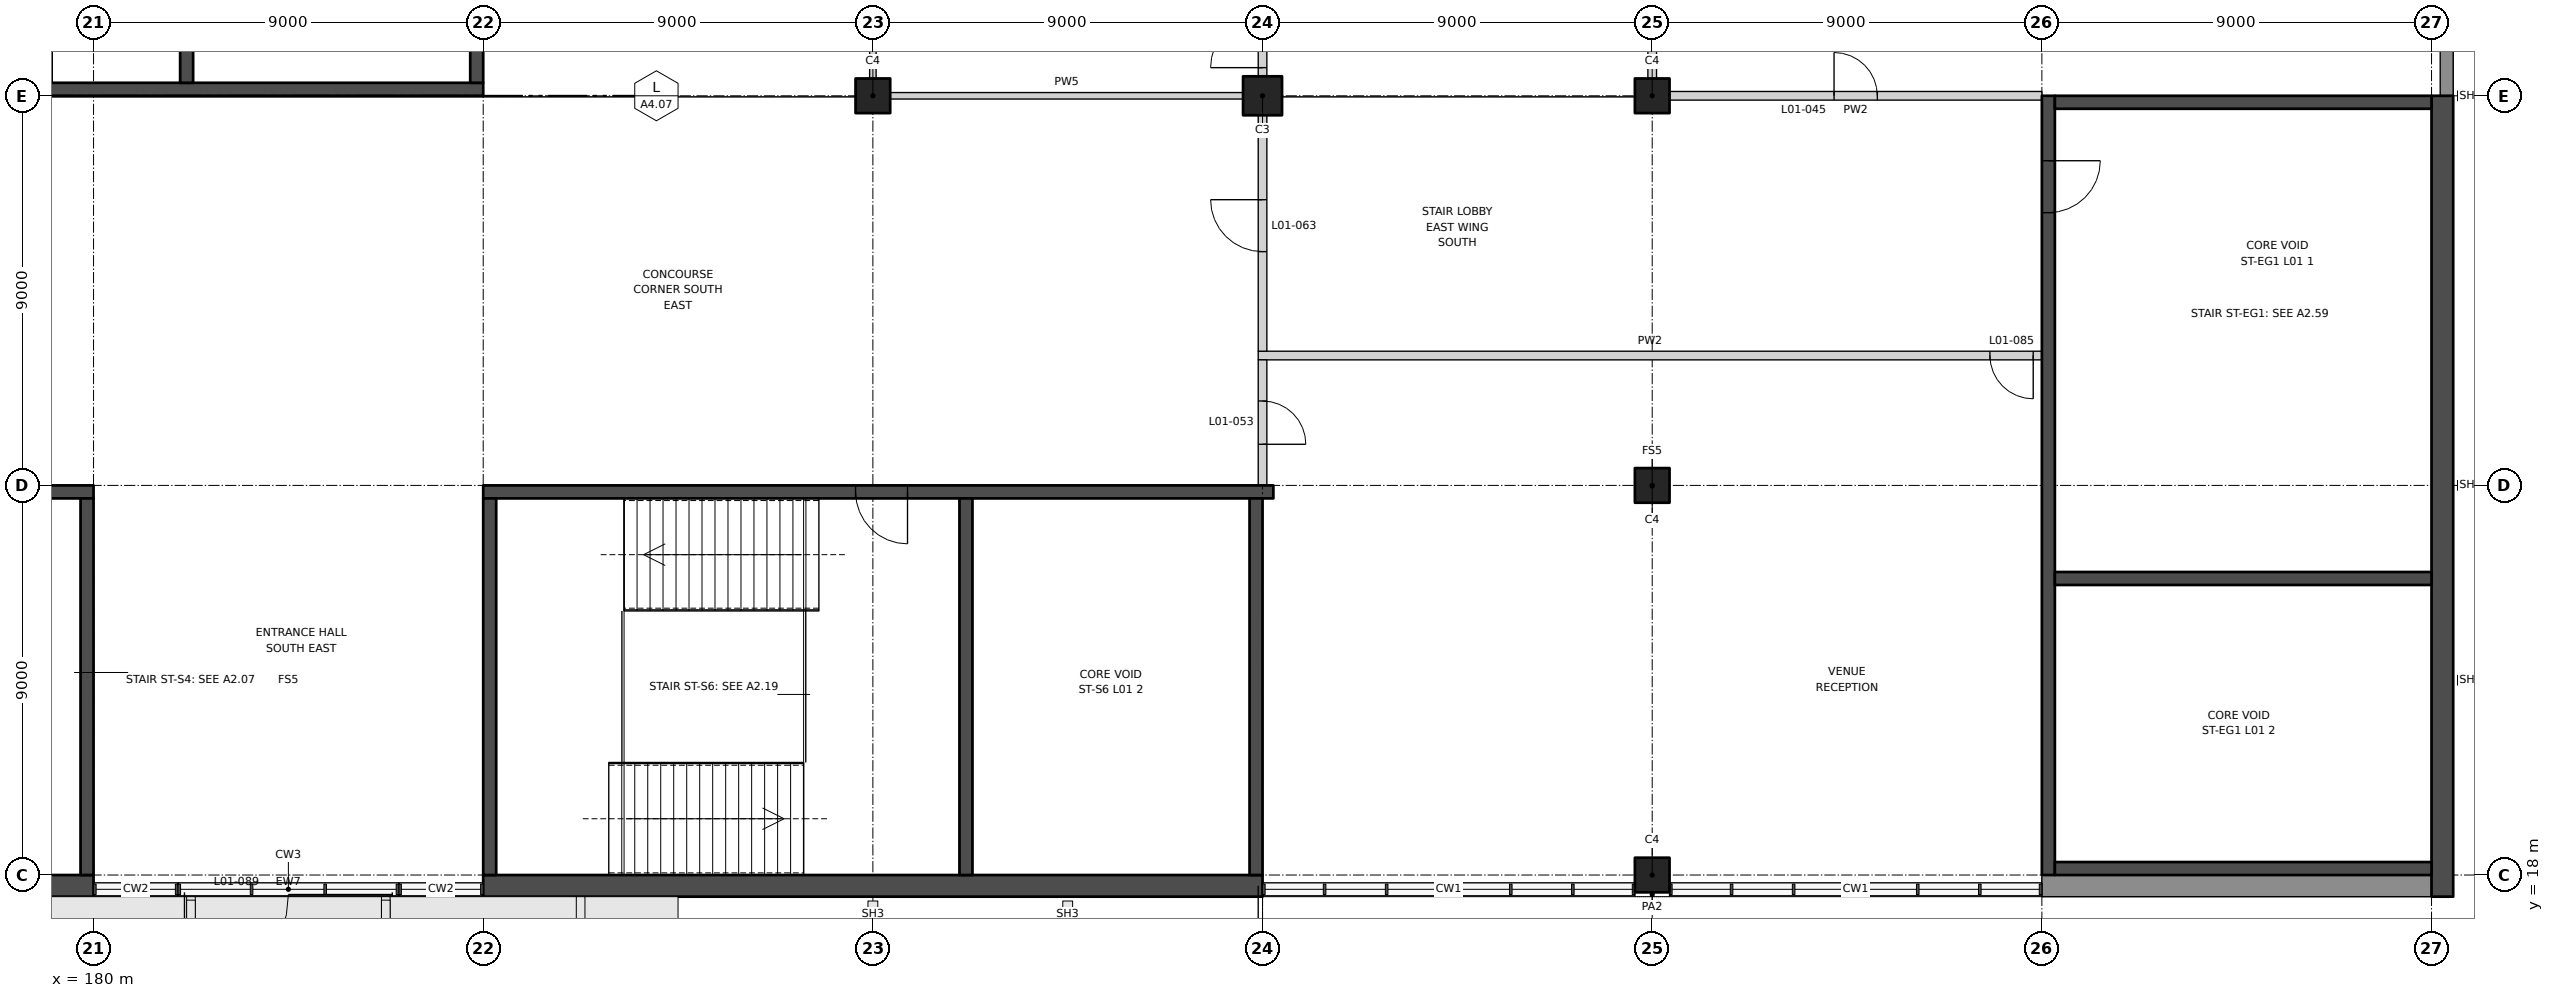
"""IFC4 building model, lengths in metres.
Left out: names, types, materials, properties, quantities, classifications, styles, units other than length and angle.
Written with IfcOpenShell. Run it as: python <this file> out.ifc"""

import sys

from ifc_helpers import new_model, si_unit, direction, frame, frame_2d, origin, origin_2d, place, context, subcontext, project, spatial, rectangle, extrude, element, fill, save


model = new_model("IFC4")
c1 = context("Model", 3, precision=1e-05, world=origin(), true_north=direction((0.0, 1.0)))
c2 = subcontext(c1, "Body", "Model", "MODEL_VIEW")
j1 = project(units=[si_unit("LENGTHUNIT", "METRE"), si_unit("PLANEANGLEUNIT", "RADIAN")], contexts=[c1])
p1 = place(None, origin())
s1 = spatial("IfcSite", under=j1, at=p1, CompositionType="ELEMENT")
p2 = place(p1, origin())
s2 = spatial("IfcBuilding", under=s1, at=p2, CompositionType="ELEMENT")
p3 = place(p2, frame((0.0, 0.0, 7.0)))
s3 = spatial("IfcBuildingStorey", under=s2, at=p3, CompositionType="ELEMENT", Elevation=7.0)
p4 = place(p3, frame((207.0, 36.0, 0.0), z_axis=(0.0, 0.0, 1.0), x_axis=(1.0, 0.0, 0.0)))
e1 = element("IfcColumn", 1, at=p4, inside=s3, PredefinedType="COLUMN", context=c2, shape_type="SweptSolid", body=[
    extrude(rectangle(XDim=0.9, YDim=0.9, at=origin_2d()), origin(), (0.0, 0.0, 1.0), 4.5),
])
for number, where, z_axis, x_axis in (
    (2, (198.0, 36.0, 0.0), (0.0, 0.0, 1.0), (1.0, 0.0, 0.0)),
    (3, (216.0, 18.0, 0.0), (0.0, 0.0, 1.0), (1.0, 0.0, 0.0)),
    (4, (216.0, 27.0, 0.0), (0.0, 0.0, 1.0), (1.0, 0.0, 0.0)),
    (5, (216.0, 36.0, 0.0), (0.0, 0.0, 1.0), (1.0, 0.0, 0.0)),
):
    element("IfcColumn", number, at=place(p3, frame(where, z_axis=z_axis, x_axis=x_axis)), inside=s3, PredefinedType="COLUMN", context=c2, shape_type="SweptSolid", body=[
        extrude(rectangle(XDim=0.8, YDim=0.8, at=origin_2d()), origin(), (0.0, 0.0, 1.0), 4.5),
    ])
p5 = place(p3, frame((206.9, 30.0, 0.0), z_axis=(0.0, 0.0, 1.0), x_axis=(1.0, 0.0, 0.0)))
e6 = element("IfcWall", 6, at=p5, inside=s3, PredefinedType="PARTITIONING", context=c2, shape_type="SweptSolid", body=[
    extrude(rectangle(XDim=18.1, YDim=0.2, at=frame_2d((9.05, 0.0))), origin(), (0.0, 0.0, 1.0), 4.5),
])
p6 = place(p5, frame((16.9, 0.0, 0.0)))
e7 = element("IfcOpeningElement", 7, at=p6, cuts=e6, PredefinedType="OPENING", context=c2, shape_type="SweptSolid", body=[
    extrude(rectangle(XDim=1.0, YDim=2.1, at=frame_2d((0.5, 1.05))), frame((0.0, 0.11, 0.0), z_axis=(0.0, -1.0, 0.0), x_axis=(1.0, 0.0, 0.0)), (0.0, 0.0, 1.0), 0.22),
])
p7 = place(p3, frame((198.4, 36.0, 0.0), z_axis=(0.0, 0.0, 1.0), x_axis=(1.0, 0.0, 0.0)))
e8 = element("IfcWall", 8, at=p7, inside=s3, PredefinedType="PARTITIONING", context=c2, shape_type="SweptSolid", body=[
    extrude(rectangle(XDim=8.15, YDim=0.15, at=frame_2d((4.075, 0.0))), origin(), (0.0, 0.0, 1.0), 3.25),
])
p8 = place(p3, frame((216.4, 36.0, 0.0), z_axis=(0.0, 0.0, 1.0), x_axis=(1.0, 0.0, 0.0)))
e9 = element("IfcWall", 9, at=p8, inside=s3, PredefinedType="PARTITIONING", context=c2, shape_type="SweptSolid", body=[
    extrude(rectangle(XDim=8.6, YDim=0.2, at=frame_2d((4.3, 0.0))), origin(), (0.0, 0.0, 1.0), 3.25),
])
p9 = place(p8, frame((3.8, 0.0, 0.0)))
e10 = element("IfcOpeningElement", 10, at=p9, cuts=e9, PredefinedType="OPENING", context=c2, shape_type="SweptSolid", body=[
    extrude(rectangle(XDim=1.0, YDim=2.1, at=frame_2d((0.5, 1.05))), frame((0.0, 0.11, 0.0), z_axis=(0.0, -1.0, 0.0), x_axis=(1.0, 0.0, 0.0)), (0.0, 0.0, 1.0), 0.22),
])
p10 = place(p3, frame((198.0, 36.4, 0.0), z_axis=(0.0, 0.0, 1.0), x_axis=(0.0, 1.0, 0.0)))
e11 = element("IfcWall", 11, at=p10, inside=s3, PredefinedType="PARTITIONING", context=c2, shape_type="SweptSolid", body=[
    extrude(rectangle(XDim=8.2, YDim=0.15, at=frame_2d((4.1, 0.0))), origin(), (0.0, 0.0, 1.0), 3.25),
])
p11 = place(p10, frame((2.6, 0.0, 0.0)))
e12 = element("IfcOpeningElement", 12, at=p11, cuts=e11, PredefinedType="OPENING", context=c2, shape_type="SweptSolid", body=[
    extrude(rectangle(XDim=3.0, YDim=2.4, at=frame_2d((1.5, 1.2))), frame((0.0, 0.085, 0.0), z_axis=(0.0, -1.0, 0.0), x_axis=(1.0, 0.0, 0.0)), (0.0, 0.0, 1.0), 0.17),
])
p12 = place(p3, frame((207.0, 27.0, 0.0), z_axis=(0.0, 0.0, 1.0), x_axis=(0.0, 1.0, 0.0)))
e13 = element("IfcWall", 13, at=p12, inside=s3, PredefinedType="PARTITIONING", context=c2, shape_type="SweptSolid", body=[
    extrude(rectangle(XDim=2.9, YDim=0.2, at=frame_2d((1.45, 0.0))), origin(), (0.0, 0.0, 1.0), 3.25),
])
p13 = place(p12, frame((0.95, 0.0, 0.0)))
e14 = element("IfcOpeningElement", 14, at=p13, cuts=e13, PredefinedType="OPENING", context=c2, shape_type="SweptSolid", body=[
    extrude(rectangle(XDim=1.0, YDim=2.1, at=frame_2d((0.5, 1.05))), frame((0.0, 0.11, 0.0), z_axis=(0.0, -1.0, 0.0), x_axis=(1.0, 0.0, 0.0)), (0.0, 0.0, 1.0), 0.22),
])
p14 = place(p3, frame((207.0, 30.1, 0.0), z_axis=(0.0, 0.0, 1.0), x_axis=(0.0, 1.0, 0.0)))
e15 = element("IfcWall", 15, at=p14, inside=s3, PredefinedType="PARTITIONING", context=c2, shape_type="SweptSolid", body=[
    extrude(rectangle(XDim=5.45, YDim=0.2, at=frame_2d((2.725, 0.0))), origin(), (0.0, 0.0, 1.0), 3.25),
])
p15 = place(p14, frame((2.3, 0.0, 0.0)))
e16 = element("IfcOpeningElement", 16, at=p15, cuts=e15, PredefinedType="OPENING", context=c2, shape_type="SweptSolid", body=[
    extrude(rectangle(XDim=1.2, YDim=2.1, at=frame_2d((0.6, 1.05))), frame((0.0, 0.11, 0.0), z_axis=(0.0, -1.0, 0.0), x_axis=(1.0, 0.0, 0.0)), (0.0, 0.0, 1.0), 0.22),
])
p16 = place(p3, frame((207.0, 36.45, 0.0), z_axis=(0.0, 0.0, 1.0), x_axis=(0.0, 1.0, 0.0)))
e17 = element("IfcWall", 17, at=p16, inside=s3, PredefinedType="PARTITIONING", context=c2, shape_type="SweptSolid", body=[
    extrude(rectangle(XDim=8.1, YDim=0.2, at=frame_2d((4.05, 0.0))), origin(), (0.0, 0.0, 1.0), 3.25),
])
p17 = place(p16, frame((0.2, 0.0, 0.0)))
e18 = element("IfcOpeningElement", 18, at=p17, cuts=e17, PredefinedType="OPENING", context=c2, shape_type="SweptSolid", body=[
    extrude(rectangle(XDim=1.2, YDim=2.1, at=frame_2d((0.6, 1.05))), frame((0.0, 0.11, 0.0), z_axis=(0.0, -1.0, 0.0), x_axis=(1.0, 0.0, 0.0)), (0.0, 0.0, 1.0), 0.22),
])
p18 = place(p3, frame((216.0, 36.4, 0.0), z_axis=(0.0, 0.0, 1.0), x_axis=(0.0, 1.0, 0.0)))
e19 = element("IfcWall", 19, at=p18, inside=s3, PredefinedType="PARTITIONING", context=c2, shape_type="SweptSolid", body=[
    extrude(rectangle(XDim=8.2, YDim=0.2, at=frame_2d((4.1, 0.0))), origin(), (0.0, 0.0, 1.0), 3.25),
])
p19 = place(p3, frame((181.95, 17.55, 0.0), z_axis=(0.0, 0.0, 1.0), x_axis=(1.0, 0.0, 0.0)))
e20 = element("IfcWall", 20, at=p19, inside=s3, PredefinedType="SOLIDWALL", context=c2, shape_type="SweptSolid", body=[
    extrude(rectangle(XDim=5.1, YDim=0.1, at=frame_2d((2.55, 0.0))), origin(), (0.0, 0.0, 1.0), 3.1),
])
p20 = place(p19, frame((0.15, 0.0, 0.0)))
e21 = element("IfcOpeningElement", 21, at=p20, cuts=e20, PredefinedType="OPENING", context=c2, shape_type="SweptSolid", body=[
    extrude(rectangle(XDim=4.8, YDim=2.7, at=frame_2d((2.4, 1.35))), frame((0.0, 0.06, 0.0), z_axis=(0.0, -1.0, 0.0), x_axis=(1.0, 0.0, 0.0)), (0.0, 0.0, 1.0), 0.12),
])
p21 = place(p3, frame((225.0, 17.75, 0.0), z_axis=(0.0, 0.0, 1.0), x_axis=(1.0, 0.0, 0.0)))
e22 = element("IfcWall", 22, at=p21, inside=s3, PredefinedType="SOLIDWALL", context=c2, shape_type="SweptSolid", body=[
    extrude(rectangle(XDim=9.0, YDim=0.5, at=frame_2d((4.5, 0.0))), origin(), (0.0, 0.0, 1.0), 4.5),
])
p22 = place(p3, frame((234.35, 36.0, 0.0), z_axis=(0.0, 0.0, 1.0), x_axis=(0.0, 1.0, 0.0)))
e23 = element("IfcWall", 23, at=p22, inside=s3, PredefinedType="SOLIDWALL", context=c2, shape_type="SweptSolid", body=[
    extrude(rectangle(XDim=8.6, YDim=0.3, at=frame_2d((4.3, 0.0))), origin(), (0.0, 0.0, 1.0), 4.5),
])
p23 = place(p22, frame((3.25, 0.0, 0.9)))
e24 = element("IfcOpeningElement", 24, at=p23, cuts=e23, PredefinedType="OPENING", context=c2, shape_type="SweptSolid", body=[
    extrude(rectangle(XDim=1.0, YDim=2.1, at=frame_2d((0.5, 1.05))), frame((0.0, 0.16, 0.0), z_axis=(0.0, -1.0, 0.0), x_axis=(1.0, 0.0, 0.0)), (0.0, 0.0, 1.0), 0.32),
])
p24 = place(p22, frame((4.75, 0.0, 0.9)))
e25 = element("IfcOpeningElement", 25, at=p24, cuts=e23, PredefinedType="OPENING", context=c2, shape_type="SweptSolid", body=[
    extrude(rectangle(XDim=1.0, YDim=2.1, at=frame_2d((0.5, 1.05))), frame((0.0, 0.16, 0.0), z_axis=(0.0, -1.0, 0.0), x_axis=(1.0, 0.0, 0.0)), (0.0, 0.0, 1.0), 0.32),
])
p25 = place(p3, frame((180.0, 26.85, 0.0), z_axis=(0.0, 0.0, 1.0), x_axis=(-1.0, 0.0, 0.0)))
e26 = element("IfcWall", 26, at=p25, inside=s3, PredefinedType="SHEAR", context=c2, shape_type="SweptSolid", body=[
    extrude(rectangle(XDim=18.0, YDim=0.3, at=frame_2d((9.0, 0.0))), origin(), (0.0, 0.0, 1.0), 4.5),
])
p26 = place(p25, frame((8.6, 0.0, 0.0)))
e27 = element("IfcOpeningElement", 27, at=p26, cuts=e26, PredefinedType="OPENING", context=c2, shape_type="SweptSolid", body=[
    extrude(rectangle(XDim=1.2, YDim=2.1, at=frame_2d((0.6, 1.05))), frame((0.0, 0.16, 0.0), z_axis=(0.0, -1.0, 0.0), x_axis=(1.0, 0.0, 0.0)), (0.0, 0.0, 1.0), 0.32),
])
p27 = place(p3, frame((180.0, 17.75, 0.0), z_axis=(0.0, 0.0, 1.0), x_axis=(-1.0, 0.0, 0.0)))
e28 = element("IfcWall", 28, at=p27, inside=s3, PredefinedType="SHEAR", context=c2, shape_type="SweptSolid", body=[
    extrude(rectangle(XDim=18.0, YDim=0.5, at=frame_2d((9.0, 0.0))), origin(), (0.0, 0.0, 1.0), 4.5),
])
p28 = place(p3, frame((179.85, 26.7, 0.0), z_axis=(0.0, 0.0, 1.0), x_axis=(0.0, -1.0, 0.0)))
e29 = element("IfcWall", 29, at=p28, inside=s3, PredefinedType="SHEAR", context=c2, shape_type="SweptSolid", body=[
    extrude(rectangle(XDim=8.7, YDim=0.3, at=frame_2d((4.35, 0.0))), origin(), (0.0, 0.0, 1.0), 4.5),
])
p29 = place(p3, frame((189.0, 26.85, 0.0), z_axis=(0.0, 0.0, 1.0), x_axis=(1.0, 0.0, 0.0)))
e30 = element("IfcWall", 30, at=p29, inside=s3, PredefinedType="SHEAR", context=c2, shape_type="SweptSolid", body=[
    extrude(rectangle(XDim=18.25, YDim=0.3, at=frame_2d((9.125, 0.0))), origin(), (0.0, 0.0, 1.0), 4.5),
])
p30 = place(p29, frame((8.6, 0.0, 0.0)))
e31 = element("IfcOpeningElement", 31, at=p30, cuts=e30, PredefinedType="OPENING", context=c2, shape_type="SweptSolid", body=[
    extrude(rectangle(XDim=1.2, YDim=2.1, at=frame_2d((0.6, 1.05))), frame((0.0, 0.16, 0.0), z_axis=(0.0, -1.0, 0.0), x_axis=(1.0, 0.0, 0.0)), (0.0, 0.0, 1.0), 0.32),
])
p31 = place(p3, frame((189.0, 17.75, 0.0), z_axis=(0.0, 0.0, 1.0), x_axis=(1.0, 0.0, 0.0)))
e32 = element("IfcWall", 32, at=p31, inside=s3, PredefinedType="SHEAR", context=c2, shape_type="SweptSolid", body=[
    extrude(rectangle(XDim=18.0, YDim=0.5, at=frame_2d((9.0, 0.0))), origin(), (0.0, 0.0, 1.0), 4.5),
])
for number, where, z_axis, x_axis in (
    (33, (189.15, 26.7, 0.0), (0.0, 0.0, 1.0), (0.0, -1.0, 0.0)),
    (34, (206.85, 26.7, 0.0), (0.0, 0.0, 1.0), (0.0, -1.0, 0.0)),
    (35, (200.15, 26.7, 0.0), (0.0, 0.0, 1.0), (0.0, -1.0, 0.0)),
):
    element("IfcWall", number, at=place(p3, frame(where, z_axis=z_axis, x_axis=x_axis)), inside=s3, PredefinedType="SHEAR", context=c2, shape_type="SweptSolid", body=[
        extrude(rectangle(XDim=8.7, YDim=0.3, at=frame_2d((4.35, 0.0))), origin(), (0.0, 0.0, 1.0), 4.5),
    ])
p32 = place(p3, frame((171.0, 36.15, 0.0), z_axis=(0.0, 0.0, 1.0), x_axis=(1.0, 0.0, 0.0)))
e36 = element("IfcWall", 36, at=p32, inside=s3, PredefinedType="SHEAR", context=c2, shape_type="SweptSolid", body=[
    extrude(rectangle(XDim=18.0, YDim=0.3, at=frame_2d((9.0, 0.0))), origin(), (0.0, 0.0, 1.0), 4.5),
])
for number, where, z_axis, x_axis in (
    (37, (188.85, 44.7, 0.0), (0.0, 0.0, 1.0), (0.0, -1.0, 0.0)),
    (38, (182.15, 44.7, 0.0), (0.0, 0.0, 1.0), (0.0, -1.0, 0.0)),
):
    element("IfcWall", number, at=place(p3, frame(where, z_axis=z_axis, x_axis=x_axis)), inside=s3, PredefinedType="SHEAR", context=c2, shape_type="SweptSolid", body=[
        extrude(rectangle(XDim=8.4, YDim=0.3, at=frame_2d((4.2, 0.0))), origin(), (0.0, 0.0, 1.0), 4.5),
    ])
p33 = place(p3, frame((225.15, 36.0, 0.0), z_axis=(0.0, 0.0, 1.0), x_axis=(0.0, -1.0, 0.0)))
e39 = element("IfcWall", 39, at=p33, inside=s3, PredefinedType="SHEAR", context=c2, shape_type="SweptSolid", body=[
    extrude(rectangle(XDim=18.0, YDim=0.3, at=frame_2d((9.0, 0.0))), origin(), (0.0, 0.0, 1.0), 4.5),
])
p34 = place(p33, frame((1.5, 0.0, 0.0)))
e40 = element("IfcOpeningElement", 40, at=p34, cuts=e39, PredefinedType="OPENING", context=c2, shape_type="SweptSolid", body=[
    extrude(rectangle(XDim=1.2, YDim=2.1, at=frame_2d((0.6, 1.05))), frame((0.0, 0.16, 0.0), z_axis=(0.0, -1.0, 0.0), x_axis=(1.0, 0.0, 0.0)), (0.0, 0.0, 1.0), 0.32),
])
p35 = place(p3, frame((234.25, 36.0, 0.0), z_axis=(0.0, 0.0, 1.0), x_axis=(0.0, -1.0, 0.0)))
e41 = element("IfcWall", 41, at=p35, inside=s3, PredefinedType="SHEAR", context=c2, shape_type="SweptSolid", body=[
    extrude(rectangle(XDim=18.5, YDim=0.5, at=frame_2d((9.25, 0.0))), origin(), (0.0, 0.0, 1.0), 4.5),
])
for number, where, z_axis, x_axis in (
    (42, (225.3, 35.85, 0.0), (0.0, 0.0, 1.0), (1.0, 0.0, 0.0)),
    (43, (225.3, 18.15, 0.0), (0.0, 0.0, 1.0), (1.0, 0.0, 0.0)),
    (44, (225.3, 24.85, 0.0), (0.0, 0.0, 1.0), (1.0, 0.0, 0.0)),
):
    element("IfcWall", number, at=place(p3, frame(where, z_axis=z_axis, x_axis=x_axis)), inside=s3, PredefinedType="SHEAR", context=c2, shape_type="SweptSolid", body=[
        extrude(rectangle(XDim=8.7, YDim=0.3, at=frame_2d((4.35, 0.0))), origin(), (0.0, 0.0, 1.0), 4.5),
    ])
p36 = place(p9, origin())
e45 = element("IfcDoor", 45, at=p36, inside=s3, OperationType="SINGLE_SWING_LEFT", PredefinedType="DOOR", context=c2, shape_type="SweptSolid", body=[
    extrude(rectangle(XDim=1.0, YDim=2.1, at=frame_2d((0.5, 1.05))), frame((0.0, 0.025, 0.0), z_axis=(0.0, -1.0, 0.0), x_axis=(1.0, 0.0, 0.0)), (0.0, 0.0, 1.0), 0.05),
])
fill(e10, e45)
p37 = place(p13, frame((1.0, 0.0, 0.0), z_axis=(0.0, 0.0, 1.0), x_axis=(-1.0, 0.0, 0.0)))
e46 = element("IfcDoor", 46, at=p37, inside=s3, OperationType="SINGLE_SWING_RIGHT", PredefinedType="DOOR", context=c2, shape_type="SweptSolid", body=[
    extrude(rectangle(XDim=1.0, YDim=2.1, at=frame_2d((0.5, 1.05))), frame((0.0, 0.025, 0.0), z_axis=(0.0, -1.0, 0.0), x_axis=(1.0, 0.0, 0.0)), (0.0, 0.0, 1.0), 0.05),
])
fill(e14, e46)
p38 = place(p15, origin())
e47 = element("IfcDoor", 47, at=p38, inside=s3, OperationType="SINGLE_SWING_RIGHT", PredefinedType="DOOR", context=c2, shape_type="SweptSolid", body=[
    extrude(rectangle(XDim=1.2, YDim=2.1, at=frame_2d((0.6, 1.05))), frame((0.0, 0.025, 0.0), z_axis=(0.0, -1.0, 0.0), x_axis=(1.0, 0.0, 0.0)), (0.0, 0.0, 1.0), 0.05),
])
fill(e16, e47)
p39 = place(p17, origin())
e48 = element("IfcDoor", 48, at=p39, inside=s3, OperationType="SINGLE_SWING_LEFT", PredefinedType="DOOR", context=c2, shape_type="SweptSolid", body=[
    extrude(rectangle(XDim=1.2, YDim=2.1, at=frame_2d((0.6, 1.05))), frame((0.0, 0.025, 0.0), z_axis=(0.0, -1.0, 0.0), x_axis=(1.0, 0.0, 0.0)), (0.0, 0.0, 1.0), 0.05),
])
fill(e18, e48)
p40 = place(p6, frame((1.0, 0.0, 0.0), z_axis=(0.0, 0.0, 1.0), x_axis=(-1.0, 0.0, 0.0)))
e49 = element("IfcDoor", 49, at=p40, inside=s3, OperationType="SINGLE_SWING_LEFT", PredefinedType="DOOR", context=c2, shape_type="SweptSolid", body=[
    extrude(rectangle(XDim=1.0, YDim=2.1, at=frame_2d((0.5, 1.05))), frame((0.0, 0.025, 0.0), z_axis=(0.0, -1.0, 0.0), x_axis=(1.0, 0.0, 0.0)), (0.0, 0.0, 1.0), 0.05),
])
fill(e7, e49)
p41 = place(p20, frame((4.8, 0.0, 0.0), z_axis=(0.0, 0.0, 1.0), x_axis=(-1.0, 0.0, 0.0)))
e50 = element("IfcDoor", 50, at=p41, inside=s3, OperationType="DOUBLE_DOOR_SINGLE_SWING", PredefinedType="DOOR", context=c2, shape_type="SweptSolid", body=[
    extrude(rectangle(XDim=4.8, YDim=2.7, at=frame_2d((2.4, 1.35))), frame((0.0, 0.025, 0.0), z_axis=(0.0, -1.0, 0.0), x_axis=(1.0, 0.0, 0.0)), (0.0, 0.0, 1.0), 0.05),
])
fill(e21, e50)
p42 = place(p30, frame((1.2, 0.0, 0.0), z_axis=(0.0, 0.0, 1.0), x_axis=(-1.0, 0.0, 0.0)))
e51 = element("IfcDoor", 51, at=p42, inside=s3, OperationType="SINGLE_SWING_LEFT", PredefinedType="DOOR", context=c2, shape_type="SweptSolid", body=[
    extrude(rectangle(XDim=1.2, YDim=2.1, at=frame_2d((0.6, 1.05))), frame((0.0, 0.025, 0.0), z_axis=(0.0, -1.0, 0.0), x_axis=(1.0, 0.0, 0.0)), (0.0, 0.0, 1.0), 0.05),
])
fill(e31, e51)
p43 = place(p34, origin())
e52 = element("IfcDoor", 52, at=p43, inside=s3, OperationType="SINGLE_SWING_LEFT", PredefinedType="DOOR", context=c2, shape_type="SweptSolid", body=[
    extrude(rectangle(XDim=1.2, YDim=2.1, at=frame_2d((0.6, 1.05))), frame((0.0, 0.025, 0.0), z_axis=(0.0, -1.0, 0.0), x_axis=(1.0, 0.0, 0.0)), (0.0, 0.0, 1.0), 0.05),
])
fill(e40, e52)
save(model, sys.argv[1])
